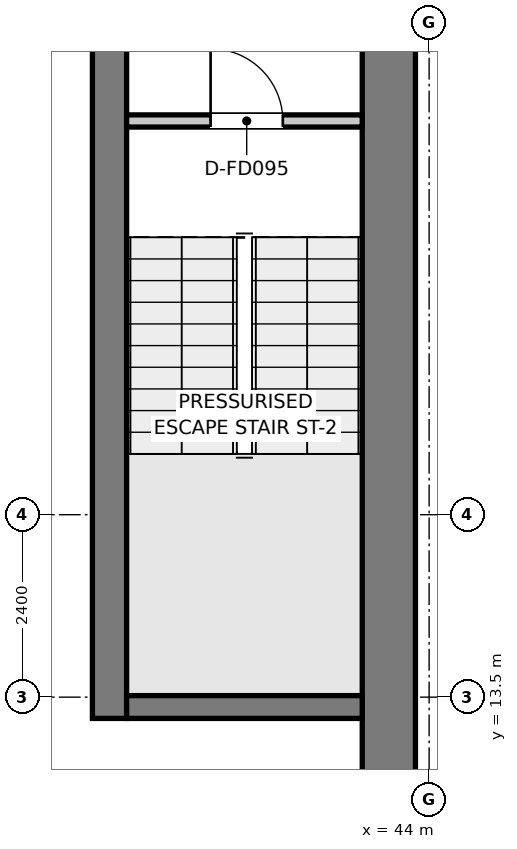
"""IFC4 building model, lengths in metres.
Left out: names, types, materials, properties, quantities, classifications, styles, units other than length and angle.
Written with IfcOpenShell. Run it as: python <this file> out.ifc"""

import sys

from ifc_helpers import new_model, si_unit, direction, frame, frame_2d, origin, place, context, subcontext, project, spatial, rectangle, extrude, element, fill, save


model = new_model("IFC4")
c1 = context("Model", 3, precision=1e-05, world=origin(), true_north=direction((0.0, 1.0)))
c2 = subcontext(c1, "Body", "Model", "MODEL_VIEW")
j1 = project(units=[si_unit("LENGTHUNIT", "METRE"), si_unit("PLANEANGLEUNIT", "RADIAN")], contexts=[c1])
p1 = place(None, origin())
s1 = spatial("IfcSite", under=j1, at=p1, CompositionType="ELEMENT")
p2 = place(p1, origin())
s2 = spatial("IfcBuilding", under=s1, at=p2, CompositionType="ELEMENT")
p3 = place(p2, frame((0.0, 0.0, 370.85)))
s3 = spatial("IfcBuildingStorey", under=s2, at=p3, CompositionType="ELEMENT", Elevation=370.85)
p4 = place(p3, frame((39.795, 13.22, 0.0), z_axis=(0.0, 0.0, 1.0), x_axis=(0.0, 1.0, 0.0)))
e1 = element("IfcWall", 1, at=p4, inside=s3, PredefinedType="SHEAR", context=c2, shape_type="SweptSolid", body=[
    extrude(rectangle(XDim=12.88, YDim=0.45, at=frame_2d((6.44, 0.0))), origin(), (0.0, 0.0, 1.0), 3.8),
])
p5 = place(p4, frame((10.58, 0.0, 0.0)))
e2 = element("IfcOpeningElement", 2, at=p5, cuts=e1, PredefinedType="OPENING", context=c2, shape_type="SweptSolid", body=[
    extrude(rectangle(XDim=1.1, YDim=2.15, at=frame_2d((0.55, 1.075))), frame((0.0, 0.235, 0.0), z_axis=(0.0, -1.0, 0.0), x_axis=(1.0, 0.0, 0.0)), (0.0, 0.0, 1.0), 0.47),
])
p6 = place(p3, frame((43.47, 11.2, 0.0), z_axis=(0.0, 0.0, 1.0), x_axis=(0.0, 1.0, 0.0)))
e3 = element("IfcWall", 3, at=p6, inside=s3, PredefinedType="SHEAR", context=c2, shape_type="SweptSolid", body=[
    extrude(rectangle(XDim=14.9, YDim=0.7, at=frame_2d((7.45, 0.0))), origin(), (0.0, 0.0, 1.0), 3.8),
])
p7 = place(p3, frame((40.02, 13.37, 0.0), z_axis=(0.0, 0.0, 1.0), x_axis=(1.0, 0.0, 0.0)))
e4 = element("IfcWall", 4, at=p7, inside=s3, PredefinedType="SHEAR", context=c2, shape_type="SweptSolid", body=[
    extrude(rectangle(XDim=3.1, YDim=0.3, at=frame_2d((1.55, 0.0))), origin(), (0.0, 0.0, 1.0), 3.8),
])
p8 = place(p3, frame((40.02, 21.08, 0.0), z_axis=(0.0, 0.0, 1.0), x_axis=(1.0, 0.0, 0.0)))
e5 = element("IfcWall", 5, at=p8, inside=s3, PredefinedType="PARTITIONING", context=c2, shape_type="SweptSolid", body=[
    extrude(rectangle(XDim=3.1, YDim=0.16, at=frame_2d((1.55, 0.0))), origin(), (0.0, 0.0, 1.0), 3.5),
])
p9 = place(p8, frame((1.105, 0.0, 0.0)))
e6 = element("IfcOpeningElement", 6, at=p9, cuts=e5, PredefinedType="OPENING", context=c2, shape_type="SweptSolid", body=[
    extrude(rectangle(XDim=0.95, YDim=2.1, at=frame_2d((0.475, 1.05))), frame((0.0, 0.09, 0.0), z_axis=(0.0, -1.0, 0.0), x_axis=(1.0, 0.0, 0.0)), (0.0, 0.0, 1.0), 0.18),
])
p10 = place(p9, origin())
e7 = element("IfcDoor", 7, at=p10, inside=s3, OperationType="SINGLE_SWING_LEFT", PredefinedType="DOOR", context=c2, shape_type="SweptSolid", body=[
    extrude(rectangle(XDim=0.95, YDim=2.1, at=frame_2d((0.475, 1.05))), frame((0.0, 0.025, 0.0), z_axis=(0.0, -1.0, 0.0), x_axis=(1.0, 0.0, 0.0)), (0.0, 0.0, 1.0), 0.05),
])
fill(e6, e7)
save(model, sys.argv[1])
